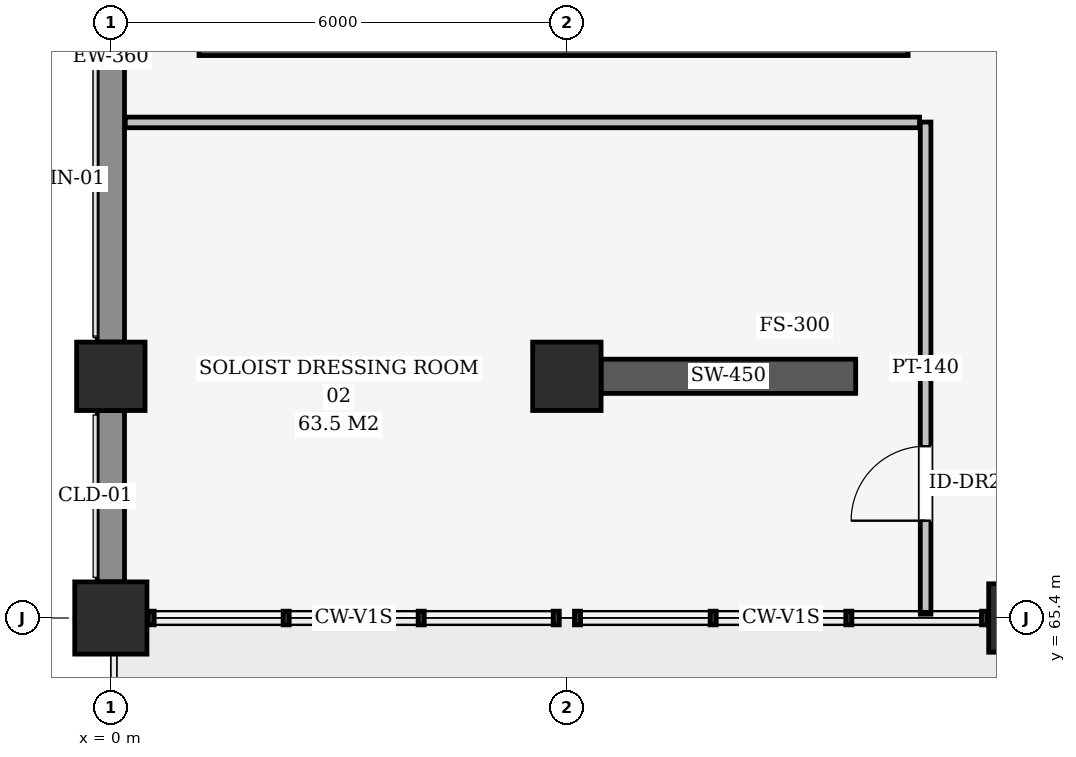
"""IFC4 building model, lengths in metres.
Left out: names, types, materials, properties, quantities, classifications, styles, units other than length and angle.
Written with IfcOpenShell. Run it as: python <this file> out.ifc"""

import sys

from ifc_helpers import new_model, si_unit, direction, frame, frame_2d, origin, origin_2d, place, context, subcontext, project, spatial, rectangle, extrude, element, fill, save


model = new_model("IFC4")
c1 = context("Model", 3, precision=1e-05, world=origin(), true_north=direction((0.0, 1.0)))
c2 = subcontext(c1, "Body", "Model", "MODEL_VIEW")
j1 = project(units=[si_unit("LENGTHUNIT", "METRE"), si_unit("PLANEANGLEUNIT", "RADIAN")], contexts=[c1])
p1 = place(None, origin())
s1 = spatial("IfcSite", under=j1, at=p1, CompositionType="ELEMENT")
p2 = place(p1, origin())
s2 = spatial("IfcBuilding", under=s1, at=p2, CompositionType="ELEMENT")
p3 = place(p2, frame((0.0, 0.0, 4.8)))
s3 = spatial("IfcBuildingStorey", under=s2, at=p3, CompositionType="ELEMENT", Elevation=4.8)
p4 = place(p3, frame((0.0, 65.4, 0.0), z_axis=(0.0, 0.0, 1.0), x_axis=(1.0, 0.0, 0.0)))
e1 = element("IfcColumn", 1, at=p4, inside=s3, PredefinedType="COLUMN", context=c2, shape_type="SweptSolid", body=[
    extrude(rectangle(XDim=0.95, YDim=0.95, at=origin_2d()), origin(), (0.0, 0.0, 1.0), 4.5),
])
for number, where, z_axis, x_axis in (
    (2, (12.0, 65.4, 0.0), (0.0, 0.0, 1.0), (1.0, 0.0, 0.0)),
    (3, (0.0, 68.58, 0.0), (0.0, 0.0, 1.0), (1.0, 0.0, 0.0)),
    (4, (6.0, 68.58, 0.0), (0.0, 0.0, 1.0), (1.0, 0.0, 0.0)),
):
    element("IfcColumn", number, at=place(p3, frame(where, z_axis=z_axis, x_axis=x_axis)), inside=s3, PredefinedType="COLUMN", context=c2, shape_type="SweptSolid", body=[
        extrude(rectangle(XDim=0.9, YDim=0.9, at=origin_2d()), origin(), (0.0, 0.0, 1.0), 4.5),
    ])
p5 = place(p3, frame((6.45, 68.58, 0.0), z_axis=(0.0, 0.0, 1.0), x_axis=(1.0, 0.0, 0.0)))
e5 = element("IfcWall", 5, at=p5, inside=s3, PredefinedType="SHEAR", context=c2, shape_type="SweptSolid", body=[
    extrude(rectangle(XDim=3.35, YDim=0.45, at=frame_2d((1.675, 0.0))), origin(), (0.0, 0.0, 1.0), 3.505),
])
p6 = place(p3, frame((0.0, 65.875, 0.0), z_axis=(0.0, 0.0, 1.0), x_axis=(0.0, 1.0, 0.0)))
e6 = element("IfcWall", 6, at=p6, inside=s3, PredefinedType="SOLIDWALL", context=c2, shape_type="SweptSolid", body=[
    extrude(rectangle(XDim=2.255, YDim=0.36, at=frame_2d((1.127, 0.0))), origin(), (0.0, 0.0, 1.0), 3.568),
])
p7 = place(p3, frame((0.0, 69.03, 0.0), z_axis=(0.0, 0.0, 1.0), x_axis=(0.0, 1.0, 0.0)))
e7 = element("IfcWall", 7, at=p7, inside=s3, PredefinedType="SOLIDWALL", context=c2, shape_type="SweptSolid", body=[
    extrude(rectangle(XDim=13.395, YDim=0.36, at=frame_2d((6.698, 0.0))), origin(), (0.0, 0.0, 1.0), 3.569),
])
p8 = place(p7, frame((5.722, 0.0, 0.85)))
e8 = element("IfcOpeningElement", 8, at=p8, cuts=e7, PredefinedType="OPENING", context=c2, shape_type="SweptSolid", body=[
    extrude(rectangle(XDim=1.95, YDim=1.75, at=frame_2d((0.975, 0.875))), frame((0.0, 0.19, 0.0), z_axis=(0.0, -1.0, 0.0), x_axis=(1.0, 0.0, 0.0)), (0.0, 0.0, 1.0), 0.38),
])
p9 = place(p3, frame((1.16, 72.945, 0.0), z_axis=(0.0, 0.0, 1.0), x_axis=(1.0, 0.0, 0.0)))
e9 = element("IfcWall", 9, at=p9, inside=s3, PredefinedType="SHEAR", context=c2, shape_type="SweptSolid", body=[
    extrude(rectangle(XDim=9.33, YDim=0.29, at=frame_2d((4.665, 0.0))), origin(), (0.0, 0.0, 1.0), 4.2),
])
p10 = place(p3, frame((10.72, 65.45, 0.0), z_axis=(0.0, 0.0, 1.0), x_axis=(0.0, 1.0, 0.0)))
e10 = element("IfcWall", 10, at=p10, inside=s3, PredefinedType="PARTITIONING", context=c2, shape_type="SweptSolid", body=[
    extrude(rectangle(XDim=6.475, YDim=0.14, at=frame_2d((3.238, 0.0))), origin(), (0.0, 0.0, 1.0), 3.718),
])
p11 = place(p10, frame((1.23, 0.0, 0.0)))
e11 = element("IfcOpeningElement", 11, at=p11, cuts=e10, PredefinedType="OPENING", context=c2, shape_type="SweptSolid", body=[
    extrude(rectangle(XDim=0.98, YDim=2.16, at=frame_2d((0.49, 1.08))), frame((0.0, 0.08, 0.0), z_axis=(0.0, -1.0, 0.0), x_axis=(1.0, 0.0, 0.0)), (0.0, 0.0, 1.0), 0.16),
])
p12 = place(p3, frame((0.19, 71.92, 0.0), z_axis=(0.0, 0.0, 1.0), x_axis=(1.0, 0.0, 0.0)))
e12 = element("IfcWall", 12, at=p12, inside=s3, PredefinedType="PARTITIONING", context=c2, shape_type="SweptSolid", body=[
    extrude(rectangle(XDim=10.45, YDim=0.14, at=frame_2d((5.225, 0.0))), origin(), (0.0, 0.0, 1.0), 4.18),
])
p13 = place(p11, origin())
e13 = element("IfcDoor", 13, at=p13, inside=s3, OperationType="SINGLE_SWING_LEFT", PredefinedType="DOOR", context=c2, shape_type="SweptSolid", body=[
    extrude(rectangle(XDim=0.98, YDim=2.16, at=frame_2d((0.49, 1.08))), frame((0.0, 0.025, 0.0), z_axis=(0.0, -1.0, 0.0), x_axis=(1.0, 0.0, 0.0)), (0.0, 0.0, 1.0), 0.05),
])
fill(e11, e13)
save(model, sys.argv[1])
